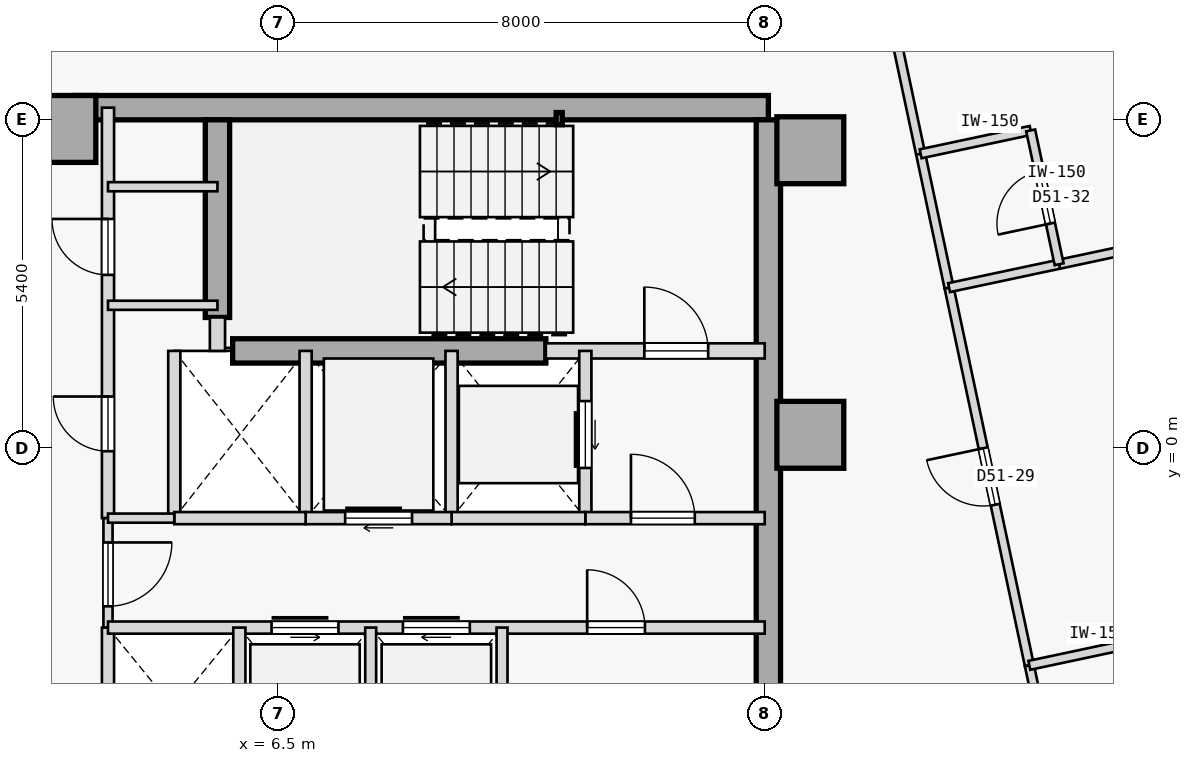
"""IFC4 building model, lengths in metres.
Left out: names, types, materials, properties, quantities, classifications, styles, units other than length and angle.
Written with IfcOpenShell. Run it as: python <this file> out.ifc"""

import sys

from ifc_helpers import new_model, si_unit, direction, frame, frame_2d, origin, origin_2d, place, context, subcontext, project, spatial, rectangle, hollow_rectangle, extrude, element, fill, save


model = new_model("IFC4")
c1 = context("Model", 3, precision=1e-05, world=origin(), true_north=direction((0.0, 1.0)))
c2 = subcontext(c1, "Body", "Model", "MODEL_VIEW")
j1 = project(units=[si_unit("LENGTHUNIT", "METRE"), si_unit("PLANEANGLEUNIT", "RADIAN")], contexts=[c1])
p1 = place(None, origin())
s1 = spatial("IfcSite", under=j1, at=p1, CompositionType="ELEMENT")
p2 = place(p1, origin())
s2 = spatial("IfcBuilding", under=s1, at=p2, CompositionType="ELEMENT")
p3 = place(p2, frame((0.0, 0.0, 195.6)))
s3 = spatial("IfcBuildingStorey", under=s2, at=p3, CompositionType="ELEMENT", Elevation=195.6)
for number, where, z_axis, x_axis in (
    (1, (15.25, 4.9, 0.0), (0.0, 0.0, 1.0), (1.0, 0.0, 0.0)),
    (2, (15.25, 0.22, 0.0), (0.0, 0.0, 1.0), (1.0, 0.0, 0.0)),
    (3, (2.95, 5.25, 0.0), (0.0, 0.0, 1.0), (1.0, 0.0, 0.0)),
):
    element("IfcColumn", number, at=place(p3, frame(where, z_axis=z_axis, x_axis=x_axis)), inside=s3, PredefinedType="COLUMN", context=c2, shape_type="SweptSolid", body=[
        extrude(rectangle(XDim=1.1, YDim=1.1, at=origin_2d()), origin(), (0.0, 0.0, 1.0), 3.4),
    ])
p4 = place(p3, frame((3.15, 5.6, 0.0), z_axis=(0.0, 0.0, 1.0), x_axis=(1.0, 0.0, 0.0)))
e4 = element("IfcWall", 4, at=p4, inside=s3, PredefinedType="SHEAR", context=c2, shape_type="SweptSolid", body=[
    extrude(rectangle(XDim=11.41, YDim=0.4, at=frame_2d((5.705, 0.0))), origin(), (0.0, 0.0, 1.0), 3.175),
])
p5 = place(p3, frame((14.56, -5.4, 0.0), z_axis=(0.0, 0.0, 1.0), x_axis=(0.0, 1.0, 0.0)))
e5 = element("IfcWall", 5, at=p5, inside=s3, PredefinedType="SHEAR", context=c2, shape_type="SweptSolid", body=[
    extrude(rectangle(XDim=10.8, YDim=0.4, at=frame_2d((5.4, 0.0))), origin(), (0.0, 0.0, 1.0), 3.175),
])
p6 = place(p3, frame((5.5, 2.15, 0.0), z_axis=(0.0, 0.0, 1.0), x_axis=(0.0, 1.0, 0.0)))
e6 = element("IfcWall", 6, at=p6, inside=s3, PredefinedType="SHEAR", context=c2, shape_type="SweptSolid", body=[
    extrude(rectangle(XDim=3.25, YDim=0.4, at=frame_2d((1.625, 0.0))), origin(), (0.0, 0.0, 1.0), 3.175),
])
p7 = place(p3, frame((5.75, 1.6, 0.0), z_axis=(0.0, 0.0, 1.0), x_axis=(1.0, 0.0, 0.0)))
e7 = element("IfcWall", 7, at=p7, inside=s3, PredefinedType="SHEAR", context=c2, shape_type="SweptSolid", body=[
    extrude(rectangle(XDim=5.15, YDim=0.4, at=frame_2d((2.575, 0.0))), origin(), (0.0, 0.0, 1.0), 3.175),
])
p8 = place(p3, frame((11.12, 5.42, 0.0), z_axis=(0.0, 0.0, 1.0), x_axis=(1.0, 0.0, 0.0)))
e8 = element("IfcColumn", 8, at=p8, inside=s3, PredefinedType="COLUMN", context=c2, shape_type="SweptSolid", body=[
    extrude(hollow_rectangle(XDim=0.1, YDim=0.2, WallThickness=0.008, at=origin_2d()), origin(), (0.0, 0.0, 1.0), 3.4),
])
p9 = place(p3, frame((10.9, 1.6, 0.0), z_axis=(0.0, 0.0, 1.0), x_axis=(1.0, 0.0, 0.0)))
e9 = element("IfcWall", 9, at=p9, inside=s3, PredefinedType="STANDARD", context=c2, shape_type="SweptSolid", body=[
    extrude(rectangle(XDim=3.6, YDim=0.25, at=frame_2d((1.8, 0.0))), origin(), (0.0, 0.0, 1.0), 3.175),
])
p10 = place(p9, frame((1.62, 0.0, 0.0)))
e10 = element("IfcOpeningElement", 10, at=p10, cuts=e9, PredefinedType="OPENING", context=c2, shape_type="SweptSolid", body=[
    extrude(rectangle(XDim=1.05, YDim=2.15, at=frame_2d((0.525, 1.075))), frame((0.0, 0.135, 0.0), z_axis=(0.0, -1.0, 0.0), x_axis=(1.0, 0.0, 0.0)), (0.0, 0.0, 1.0), 0.27),
])
p11 = place(p3, frame((5.5, 1.6, 0.0), z_axis=(0.0, 0.0, 1.0), x_axis=(0.0, 1.0, 0.0)))
e11 = element("IfcWall", 11, at=p11, inside=s3, PredefinedType="STANDARD", context=c2, shape_type="SweptSolid", body=[
    extrude(rectangle(XDim=0.55, YDim=0.25, at=frame_2d((0.275, 0.0))), origin(), (0.0, 0.0, 1.0), 3.175),
])
p12 = place(p3, frame((3.7, -1.15, 0.0), z_axis=(0.0, 0.0, 1.0), x_axis=(0.0, 1.0, 0.0)))
e12 = element("IfcWall", 12, at=p12, inside=s3, PredefinedType="STANDARD", context=c2, shape_type="SweptSolid", body=[
    extrude(rectangle(XDim=6.75, YDim=0.2, at=frame_2d((3.375, 0.0))), origin(), (0.0, 0.0, 1.0), 3.175),
])
p13 = place(p12, frame((1.1, 0.0, 0.0)))
e13 = element("IfcOpeningElement", 13, at=p13, cuts=e12, PredefinedType="OPENING", context=c2, shape_type="SweptSolid", body=[
    extrude(rectangle(XDim=0.9, YDim=2.15, at=frame_2d((0.45, 1.075))), frame((0.0, 0.11, 0.0), z_axis=(0.0, -1.0, 0.0), x_axis=(1.0, 0.0, 0.0)), (0.0, 0.0, 1.0), 0.22),
])
p14 = place(p12, frame((4.0, 0.0, 0.0)))
e14 = element("IfcOpeningElement", 14, at=p14, cuts=e12, PredefinedType="OPENING", context=c2, shape_type="SweptSolid", body=[
    extrude(rectangle(XDim=0.92, YDim=2.15, at=frame_2d((0.46, 1.075))), frame((0.0, 0.11, 0.0), z_axis=(0.0, -1.0, 0.0), x_axis=(1.0, 0.0, 0.0)), (0.0, 0.0, 1.0), 0.22),
])
p15 = place(p3, frame((3.7, -2.95, 0.0), z_axis=(0.0, 0.0, 1.0), x_axis=(0.0, 1.0, 0.0)))
e15 = element("IfcWall", 15, at=p15, inside=s3, PredefinedType="PARTITIONING", context=c2, shape_type="SweptSolid", body=[
    extrude(rectangle(XDim=1.8, YDim=0.15, at=frame_2d((0.9, 0.0))), origin(), (0.0, 0.0, 1.0), 3.175),
])
p16 = place(p15, frame((0.35, 0.0, 0.0)))
e16 = element("IfcOpeningElement", 16, at=p16, cuts=e15, PredefinedType="OPENING", context=c2, shape_type="SweptSolid", body=[
    extrude(rectangle(XDim=1.05, YDim=2.18, at=frame_2d((0.525, 1.09))), frame((0.0, 0.085, 0.0), z_axis=(0.0, -1.0, 0.0), x_axis=(1.0, 0.0, 0.0)), (0.0, 0.0, 1.0), 0.17),
])
p17 = place(p3, frame((3.7, -5.6, 0.0), z_axis=(0.0, 0.0, 1.0), x_axis=(0.0, 1.0, 0.0)))
e17 = element("IfcWall", 17, at=p17, inside=s3, PredefinedType="STANDARD", context=c2, shape_type="SweptSolid", body=[
    extrude(rectangle(XDim=2.65, YDim=0.2, at=frame_2d((1.325, 0.0))), origin(), (0.0, 0.0, 1.0), 3.175),
])
p18 = place(p3, frame((11.55, -1.15, 0.0), z_axis=(0.0, 0.0, 1.0), x_axis=(0.0, 1.0, 0.0)))
e18 = element("IfcWall", 18, at=p18, inside=s3, PredefinedType="STANDARD", context=c2, shape_type="SweptSolid", body=[
    extrude(rectangle(XDim=2.75, YDim=0.2, at=frame_2d((1.375, 0.0))), origin(), (0.0, 0.0, 1.0), 3.175),
])
p19 = place(p18, frame((0.825, 0.0, 0.0)))
e19 = element("IfcOpeningElement", 19, at=p19, cuts=e18, PredefinedType="OPENING", context=c2, shape_type="SweptSolid", body=[
    extrude(rectangle(XDim=1.1, YDim=2.15, at=frame_2d((0.55, 1.075))), frame((0.0, 0.11, 0.0), z_axis=(0.0, -1.0, 0.0), x_axis=(1.0, 0.0, 0.0)), (0.0, 0.0, 1.0), 0.22),
])
p20 = place(p3, frame((9.35, -1.15, 0.0), z_axis=(0.0, 0.0, 1.0), x_axis=(0.0, 1.0, 0.0)))
e20 = element("IfcWall", 20, at=p20, inside=s3, PredefinedType="STANDARD", context=c2, shape_type="SweptSolid", body=[
    extrude(rectangle(XDim=2.75, YDim=0.2, at=frame_2d((1.375, 0.0))), origin(), (0.0, 0.0, 1.0), 3.175),
])
p21 = place(p3, frame((11.55, -1.15, 0.0), z_axis=(0.0, 0.0, 1.0), x_axis=(1.0, 0.0, 0.0)))
e21 = element("IfcWall", 21, at=p21, inside=s3, PredefinedType="STANDARD", context=c2, shape_type="SweptSolid", body=[
    extrude(rectangle(XDim=2.95, YDim=0.2, at=frame_2d((1.475, 0.0))), origin(), (0.0, 0.0, 1.0), 3.175),
])
p22 = place(p21, frame((0.75, 0.0, 0.0)))
e22 = element("IfcOpeningElement", 22, at=p22, cuts=e21, PredefinedType="OPENING", context=c2, shape_type="SweptSolid", body=[
    extrude(rectangle(XDim=1.05, YDim=2.18, at=frame_2d((0.525, 1.09))), frame((0.0, 0.11, 0.0), z_axis=(0.0, -1.0, 0.0), x_axis=(1.0, 0.0, 0.0)), (0.0, 0.0, 1.0), 0.22),
])
p23 = place(p3, frame((9.35, -1.15, 0.0), z_axis=(0.0, 0.0, 1.0), x_axis=(1.0, 0.0, 0.0)))
e23 = element("IfcWall", 23, at=p23, inside=s3, PredefinedType="STANDARD", context=c2, shape_type="SweptSolid", body=[
    extrude(rectangle(XDim=2.2, YDim=0.2, at=frame_2d((1.1, 0.0))), origin(), (0.0, 0.0, 1.0), 3.175),
])
p24 = place(p3, frame((6.95, -1.15, 0.0), z_axis=(0.0, 0.0, 1.0), x_axis=(0.0, 1.0, 0.0)))
e24 = element("IfcWall", 24, at=p24, inside=s3, PredefinedType="STANDARD", context=c2, shape_type="SweptSolid", body=[
    extrude(rectangle(XDim=2.75, YDim=0.2, at=frame_2d((1.375, 0.0))), origin(), (0.0, 0.0, 1.0), 3.175),
])
p25 = place(p3, frame((6.95, -1.15, 0.0), z_axis=(0.0, 0.0, 1.0), x_axis=(1.0, 0.0, 0.0)))
e25 = element("IfcWall", 25, at=p25, inside=s3, PredefinedType="STANDARD", context=c2, shape_type="SweptSolid", body=[
    extrude(rectangle(XDim=2.4, YDim=0.2, at=frame_2d((1.2, 0.0))), origin(), (0.0, 0.0, 1.0), 3.175),
])
p26 = place(p25, frame((0.65, 0.0, 0.0)))
e26 = element("IfcOpeningElement", 26, at=p26, cuts=e25, PredefinedType="OPENING", context=c2, shape_type="SweptSolid", body=[
    extrude(rectangle(XDim=1.1, YDim=2.15, at=frame_2d((0.55, 1.075))), frame((0.0, 0.11, 0.0), z_axis=(0.0, -1.0, 0.0), x_axis=(1.0, 0.0, 0.0)), (0.0, 0.0, 1.0), 0.22),
])
p27 = place(p3, frame((4.79, -1.15, 0.0), z_axis=(0.0, 0.0, 1.0), x_axis=(0.0, 1.0, 0.0)))
e27 = element("IfcWall", 27, at=p27, inside=s3, PredefinedType="STANDARD", context=c2, shape_type="SweptSolid", body=[
    extrude(rectangle(XDim=2.75, YDim=0.2, at=frame_2d((1.375, 0.0))), origin(), (0.0, 0.0, 1.0), 3.175),
])
p28 = place(p3, frame((4.79, -1.15, 0.0), z_axis=(0.0, 0.0, 1.0), x_axis=(1.0, 0.0, 0.0)))
e28 = element("IfcWall", 28, at=p28, inside=s3, PredefinedType="STANDARD", context=c2, shape_type="SweptSolid", body=[
    extrude(rectangle(XDim=2.16, YDim=0.2, at=frame_2d((1.08, 0.0))), origin(), (0.0, 0.0, 1.0), 3.175),
])
p29 = place(p3, frame((3.7, -1.15, 0.0), z_axis=(0.0, 0.0, 1.0), x_axis=(1.0, 0.0, 0.0)))
e29 = element("IfcWall", 29, at=p29, inside=s3, PredefinedType="PARTITIONING", context=c2, shape_type="SweptSolid", body=[
    extrude(rectangle(XDim=1.09, YDim=0.15, at=frame_2d((0.545, 0.0))), origin(), (0.0, 0.0, 1.0), 3.175),
])
p30 = place(p3, frame((3.7, -2.95, 0.0), z_axis=(0.0, 0.0, 1.0), x_axis=(1.0, 0.0, 0.0)))
e30 = element("IfcWall", 30, at=p30, inside=s3, PredefinedType="STANDARD", context=c2, shape_type="SweptSolid", body=[
    extrude(rectangle(XDim=10.8, YDim=0.2, at=frame_2d((5.4, 0.0))), origin(), (0.0, 0.0, 1.0), 3.175),
])
p31 = place(p30, frame((2.69, 0.0, 0.0)))
e31 = element("IfcOpeningElement", 31, at=p31, cuts=e30, PredefinedType="OPENING", context=c2, shape_type="SweptSolid", body=[
    extrude(rectangle(XDim=1.1, YDim=2.15, at=frame_2d((0.55, 1.075))), frame((0.0, 0.11, 0.0), z_axis=(0.0, -1.0, 0.0), x_axis=(1.0, 0.0, 0.0)), (0.0, 0.0, 1.0), 0.22),
])
p32 = place(p30, frame((4.85, 0.0, 0.0)))
e32 = element("IfcOpeningElement", 32, at=p32, cuts=e30, PredefinedType="OPENING", context=c2, shape_type="SweptSolid", body=[
    extrude(rectangle(XDim=1.1, YDim=2.15, at=frame_2d((0.55, 1.075))), frame((0.0, 0.11, 0.0), z_axis=(0.0, -1.0, 0.0), x_axis=(1.0, 0.0, 0.0)), (0.0, 0.0, 1.0), 0.22),
])
p33 = place(p30, frame((7.88, 0.0, 0.0)))
e33 = element("IfcOpeningElement", 33, at=p33, cuts=e30, PredefinedType="OPENING", context=c2, shape_type="SweptSolid", body=[
    extrude(rectangle(XDim=0.95, YDim=2.15, at=frame_2d((0.475, 1.075))), frame((0.0, 0.11, 0.0), z_axis=(0.0, -1.0, 0.0), x_axis=(1.0, 0.0, 0.0)), (0.0, 0.0, 1.0), 0.22),
])
p34 = place(p3, frame((5.86, -5.6, 0.0), z_axis=(0.0, 0.0, 1.0), x_axis=(0.0, 1.0, 0.0)))
e34 = element("IfcWall", 34, at=p34, inside=s3, PredefinedType="STANDARD", context=c2, shape_type="SweptSolid", body=[
    extrude(rectangle(XDim=2.65, YDim=0.2, at=frame_2d((1.325, 0.0))), origin(), (0.0, 0.0, 1.0), 3.175),
])
for number, where, z_axis, x_axis in (
    (35, (10.18, -5.6, 0.0), (0.0, 0.0, 1.0), (0.0, 1.0, 0.0)),
    (36, (8.02, -5.6, 0.0), (0.0, 0.0, 1.0), (0.0, 1.0, 0.0)),
):
    element("IfcWall", number, at=place(p3, frame(where, z_axis=z_axis, x_axis=x_axis)), inside=s3, PredefinedType="STANDARD", context=c2, shape_type="SweptSolid", body=[
        extrude(rectangle(XDim=2.65, YDim=0.18, at=frame_2d((1.325, 0.0))), origin(), (0.0, 0.0, 1.0), 3.175),
    ])
for number, where, z_axis, x_axis in (
    (37, (3.7, 4.3, 0.0), (0.0, 0.0, 1.0), (1.0, 0.0, 0.0)),
    (38, (3.7, 2.35, 0.0), (0.0, 0.0, 1.0), (1.0, 0.0, 0.0)),
):
    element("IfcWall", number, at=place(p3, frame(where, z_axis=z_axis, x_axis=x_axis)), inside=s3, PredefinedType="PARTITIONING", context=c2, shape_type="SweptSolid", body=[
        extrude(rectangle(XDim=1.8, YDim=0.15, at=frame_2d((0.9, 0.0))), origin(), (0.0, 0.0, 1.0), 3.175),
    ])
p35 = place(p3, frame((18.852, -3.571, 0.0), z_axis=(0.0, 0.0, 1.0), x_axis=(-0.207879907349, 0.978154355979, 0.0)))
e39 = element("IfcWall", 39, at=p35, inside=s3, PredefinedType="PARTITIONING", context=c2, shape_type="SweptSolid", body=[
    extrude(rectangle(XDim=6.35, YDim=0.15, at=frame_2d((3.175, 0.0))), origin(), (0.0, 0.0, 1.0), 3.175),
])
p36 = place(p35, frame((2.7, 0.0, 0.0)))
e40 = element("IfcOpeningElement", 40, at=p36, cuts=e39, PredefinedType="OPENING", context=c2, shape_type="SweptSolid", body=[
    extrude(rectangle(XDim=0.95, YDim=2.15, at=frame_2d((0.475, 1.075))), frame((0.0, 0.085, 0.0), z_axis=(0.0, -1.0, 0.0), x_axis=(1.0, 0.0, 0.0)), (0.0, 0.0, 1.0), 0.17),
])
p37 = place(p3, frame((19.32, -5.771, 0.0), z_axis=(0.0, 0.0, 1.0), x_axis=(-0.207913264065, 0.978147266328, 0.0)))
e41 = element("IfcWall", 41, at=p37, inside=s3, PredefinedType="PARTITIONING", context=c2, shape_type="SweptSolid", body=[
    extrude(rectangle(XDim=2.25, YDim=0.15, at=frame_2d((1.125, 0.0))), origin(), (0.0, 0.0, 1.0), 3.175),
])
p38 = place(p3, frame((17.064, 4.841, 0.0), z_axis=(0.0, 0.0, 1.0), x_axis=(-0.207924511115, 0.978144875608, 0.0)))
e42 = element("IfcWall", 42, at=p38, inside=s3, PredefinedType="PARTITIONING", context=c2, shape_type="SweptSolid", body=[
    extrude(rectangle(XDim=6.35, YDim=0.15, at=frame_2d((3.175, 0.0))), origin(), (0.0, 0.0, 1.0), 3.175),
])
p39 = place(p38, frame((2.7, 0.0, 0.0)))
e43 = element("IfcOpeningElement", 43, at=p39, cuts=e42, PredefinedType="OPENING", context=c2, shape_type="SweptSolid", body=[
    extrude(rectangle(XDim=0.95, YDim=2.15, at=frame_2d((0.475, 1.075))), frame((0.0, 0.085, 0.0), z_axis=(0.0, -1.0, 0.0), x_axis=(1.0, 0.0, 0.0)), (0.0, 0.0, 1.0), 0.17),
])
p40 = place(p3, frame((17.532, 2.641, 0.0), z_axis=(0.0, 0.0, 1.0), x_axis=(-0.207913264065, 0.978147266328, 0.0)))
e44 = element("IfcWall", 44, at=p40, inside=s3, PredefinedType="PARTITIONING", context=c2, shape_type="SweptSolid", body=[
    extrude(rectangle(XDim=2.25, YDim=0.15, at=frame_2d((1.125, 0.0))), origin(), (0.0, 0.0, 1.0), 3.175),
])
p41 = place(p3, frame((18.852, -3.571, 0.0), z_axis=(0.0, 0.0, 1.0), x_axis=(0.978139061018, 0.207951862966, 0.0)))
e45 = element("IfcWall", 45, at=p41, inside=s3, PredefinedType="PARTITIONING", context=c2, shape_type="SweptSolid", body=[
    extrude(rectangle(XDim=1.85, YDim=0.15, at=frame_2d((0.925, 0.0))), origin(), (0.0, 0.0, 1.0), 3.175),
])
p42 = place(p3, frame((19.341, 3.025, 0.0), z_axis=(0.0, 0.0, 1.0), x_axis=(0.97814556055, 0.207921288896, 0.0)))
e46 = element("IfcWall", 46, at=p42, inside=s3, PredefinedType="PARTITIONING", context=c2, shape_type="SweptSolid", body=[
    extrude(rectangle(XDim=12.187, YDim=0.15, at=frame_2d((6.094, 0.0))), origin(), (0.0, 0.0, 1.0), 3.175),
])
p43 = place(p3, frame((17.532, 2.641, 0.0), z_axis=(0.0, 0.0, 1.0), x_axis=(0.978160192495, 0.207852442415, 0.0)))
e47 = element("IfcWall", 47, at=p43, inside=s3, PredefinedType="PARTITIONING", context=c2, shape_type="SweptSolid", body=[
    extrude(rectangle(XDim=1.85, YDim=0.15, at=frame_2d((0.925, 0.0))), origin(), (0.0, 0.0, 1.0), 3.175),
])
p44 = place(p3, frame((17.064, 4.841, 0.0), z_axis=(0.0, 0.0, 1.0), x_axis=(0.978133353907, 0.20797870558, 0.0)))
e48 = element("IfcWall", 48, at=p44, inside=s3, PredefinedType="PARTITIONING", context=c2, shape_type="SweptSolid", body=[
    extrude(rectangle(XDim=1.85, YDim=0.15, at=frame_2d((0.925, 0.0))), origin(), (0.0, 0.0, 1.0), 3.175),
])
p45 = place(p3, frame((19.341, 3.025, 0.0), z_axis=(0.0, 0.0, 1.0), x_axis=(-0.207891197838, 0.978151956427, 0.0)))
e49 = element("IfcWall", 49, at=p45, inside=s3, PredefinedType="PARTITIONING", context=c2, shape_type="SweptSolid", body=[
    extrude(rectangle(XDim=2.25, YDim=0.15, at=frame_2d((1.125, 0.0))), origin(), (0.0, 0.0, 1.0), 3.175),
])
p46 = place(p45, frame((0.685, 0.0, 0.0)))
e50 = element("IfcOpeningElement", 50, at=p46, cuts=e49, PredefinedType="OPENING", context=c2, shape_type="SweptSolid", body=[
    extrude(rectangle(XDim=0.88, YDim=2.15, at=frame_2d((0.44, 1.075))), frame((0.0, 0.085, 0.0), z_axis=(0.0, -1.0, 0.0), x_axis=(1.0, 0.0, 0.0)), (0.0, 0.0, 1.0), 0.17),
])
p47 = place(p10, origin())
e51 = element("IfcDoor", 51, at=p47, inside=s3, OperationType="SINGLE_SWING_LEFT", PredefinedType="DOOR", context=c2, shape_type="SweptSolid", body=[
    extrude(rectangle(XDim=1.05, YDim=2.15, at=frame_2d((0.525, 1.075))), frame((0.0, 0.025, 0.0), z_axis=(0.0, -1.0, 0.0), x_axis=(1.0, 0.0, 0.0)), (0.0, 0.0, 1.0), 0.05),
])
fill(e10, e51)
p48 = place(p22, origin())
e52 = element("IfcDoor", 52, at=p48, inside=s3, OperationType="SINGLE_SWING_LEFT", PredefinedType="DOOR", context=c2, shape_type="SweptSolid", body=[
    extrude(rectangle(XDim=1.05, YDim=2.18, at=frame_2d((0.525, 1.09))), frame((0.0, 0.025, 0.0), z_axis=(0.0, -1.0, 0.0), x_axis=(1.0, 0.0, 0.0)), (0.0, 0.0, 1.0), 0.05),
])
fill(e22, e52)
p49 = place(p16, frame((1.05, 0.0, 0.0), z_axis=(0.0, 0.0, 1.0), x_axis=(-1.0, 0.0, 0.0)))
e53 = element("IfcDoor", 53, at=p49, inside=s3, OperationType="SINGLE_SWING_RIGHT", PredefinedType="DOOR", context=c2, shape_type="SweptSolid", body=[
    extrude(rectangle(XDim=1.05, YDim=2.18, at=frame_2d((0.525, 1.09))), frame((0.0, 0.025, 0.0), z_axis=(0.0, -1.0, 0.0), x_axis=(1.0, 0.0, 0.0)), (0.0, 0.0, 1.0), 0.05),
])
fill(e16, e53)
p50 = place(p19, origin())
e54 = element("IfcDoor", 54, at=p50, inside=s3, OperationType="SLIDING_TO_RIGHT", PredefinedType="DOOR", context=c2, shape_type="SweptSolid", body=[
    extrude(rectangle(XDim=1.1, YDim=2.15, at=frame_2d((0.55, 1.075))), frame((0.0, 0.025, 0.0), z_axis=(0.0, -1.0, 0.0), x_axis=(1.0, 0.0, 0.0)), (0.0, 0.0, 1.0), 0.05),
])
fill(e19, e54)
p51 = place(p26, origin())
e55 = element("IfcDoor", 55, at=p51, inside=s3, OperationType="SLIDING_TO_RIGHT", PredefinedType="DOOR", context=c2, shape_type="SweptSolid", body=[
    extrude(rectangle(XDim=1.1, YDim=2.15, at=frame_2d((0.55, 1.075))), frame((0.0, 0.025, 0.0), z_axis=(0.0, -1.0, 0.0), x_axis=(1.0, 0.0, 0.0)), (0.0, 0.0, 1.0), 0.05),
])
fill(e26, e55)
p52 = place(p31, origin())
e56 = element("IfcDoor", 56, at=p52, inside=s3, OperationType="SLIDING_TO_LEFT", PredefinedType="DOOR", context=c2, shape_type="SweptSolid", body=[
    extrude(rectangle(XDim=1.1, YDim=2.15, at=frame_2d((0.55, 1.075))), frame((0.0, 0.025, 0.0), z_axis=(0.0, -1.0, 0.0), x_axis=(1.0, 0.0, 0.0)), (0.0, 0.0, 1.0), 0.05),
])
fill(e31, e56)
p53 = place(p32, origin())
e57 = element("IfcDoor", 57, at=p53, inside=s3, OperationType="SLIDING_TO_RIGHT", PredefinedType="DOOR", context=c2, shape_type="SweptSolid", body=[
    extrude(rectangle(XDim=1.1, YDim=2.15, at=frame_2d((0.55, 1.075))), frame((0.0, 0.025, 0.0), z_axis=(0.0, -1.0, 0.0), x_axis=(1.0, 0.0, 0.0)), (0.0, 0.0, 1.0), 0.05),
])
fill(e32, e57)
p54 = place(p33, origin())
e58 = element("IfcDoor", 58, at=p54, inside=s3, OperationType="SINGLE_SWING_LEFT", PredefinedType="DOOR", context=c2, shape_type="SweptSolid", body=[
    extrude(rectangle(XDim=0.95, YDim=2.15, at=frame_2d((0.475, 1.075))), frame((0.0, 0.025, 0.0), z_axis=(0.0, -1.0, 0.0), x_axis=(1.0, 0.0, 0.0)), (0.0, 0.0, 1.0), 0.05),
])
fill(e33, e58)
p55 = place(p13, origin())
e59 = element("IfcDoor", 59, at=p55, inside=s3, OperationType="SINGLE_SWING_RIGHT", PredefinedType="DOOR", context=c2, shape_type="SweptSolid", body=[
    extrude(rectangle(XDim=0.9, YDim=2.15, at=frame_2d((0.45, 1.075))), frame((0.0, 0.025, 0.0), z_axis=(0.0, -1.0, 0.0), x_axis=(1.0, 0.0, 0.0)), (0.0, 0.0, 1.0), 0.05),
])
fill(e13, e59)
p56 = place(p14, origin())
e60 = element("IfcDoor", 60, at=p56, inside=s3, OperationType="SINGLE_SWING_RIGHT", PredefinedType="DOOR", context=c2, shape_type="SweptSolid", body=[
    extrude(rectangle(XDim=0.92, YDim=2.15, at=frame_2d((0.46, 1.075))), frame((0.0, 0.025, 0.0), z_axis=(0.0, -1.0, 0.0), x_axis=(1.0, 0.0, 0.0)), (0.0, 0.0, 1.0), 0.05),
])
fill(e14, e60)
p57 = place(p36, origin())
e61 = element("IfcDoor", 61, at=p57, inside=s3, OperationType="SINGLE_SWING_RIGHT", PredefinedType="DOOR", context=c2, shape_type="SweptSolid", body=[
    extrude(rectangle(XDim=0.95, YDim=2.15, at=frame_2d((0.475, 1.075))), frame((0.0, 0.025, 0.0), z_axis=(0.0, -1.0, 0.0), x_axis=(1.0, 0.0, 0.0)), (0.0, 0.0, 1.0), 0.05),
])
fill(e40, e61)
p58 = place(p46, origin())
e62 = element("IfcDoor", 62, at=p58, inside=s3, OperationType="SINGLE_SWING_LEFT", PredefinedType="DOOR", context=c2, shape_type="SweptSolid", body=[
    extrude(rectangle(XDim=0.88, YDim=2.15, at=frame_2d((0.44, 1.075))), frame((0.0, 0.025, 0.0), z_axis=(0.0, -1.0, 0.0), x_axis=(1.0, 0.0, 0.0)), (0.0, 0.0, 1.0), 0.05),
])
fill(e50, e62)
save(model, sys.argv[1])
